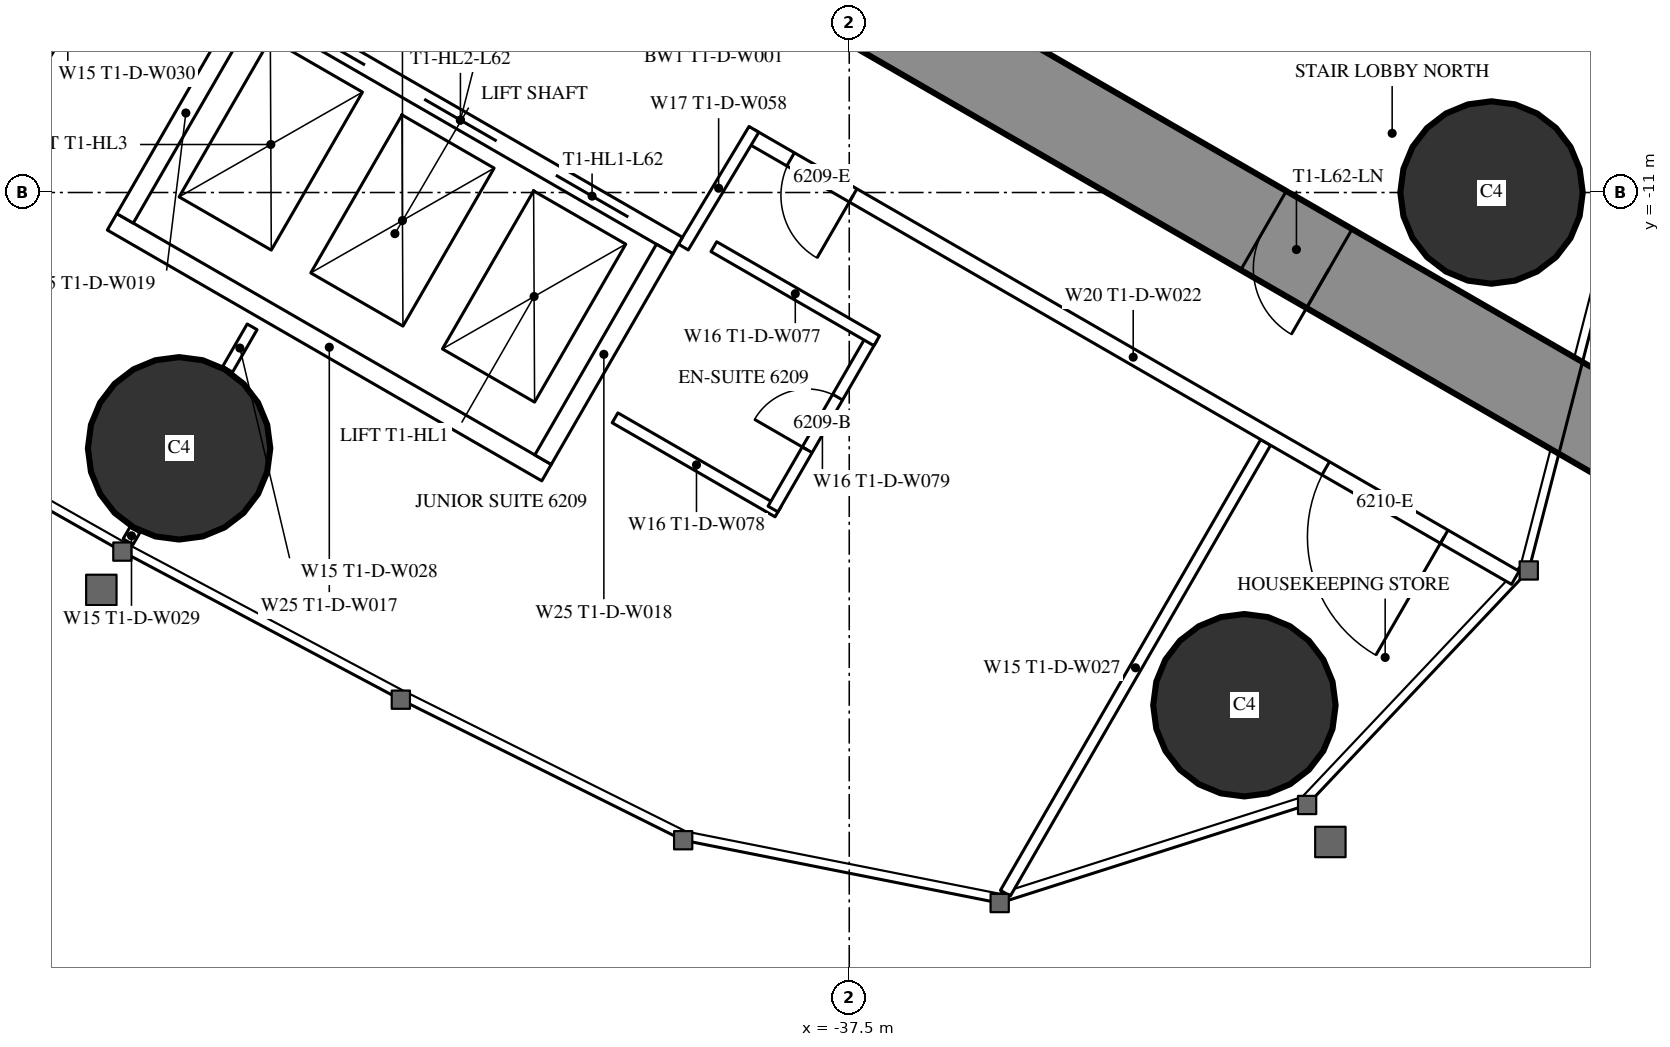
"""IFC4 building model, lengths in metres.
Left out: names, types, materials, properties, quantities, classifications, styles, units other than length and angle.
Written with IfcOpenShell. Run it as: python <this file> out.ifc"""

import sys

from ifc_helpers import new_model, si_unit, direction, frame, frame_2d, origin, origin_2d, place, context, subcontext, project, spatial, rectangle, circle, extrude, element, fill, save


model = new_model("IFC4")
c1 = context("Model", 3, precision=1e-05, world=origin(), true_north=direction((0.0, 1.0)))
c2 = subcontext(c1, "Body", "Model", "MODEL_VIEW")
j1 = project(units=[si_unit("LENGTHUNIT", "METRE"), si_unit("PLANEANGLEUNIT", "RADIAN")], contexts=[c1])
p1 = place(None, origin())
s1 = spatial("IfcSite", under=j1, at=p1, CompositionType="ELEMENT")
p2 = place(p1, origin())
s2 = spatial("IfcBuilding", under=s1, at=p2, CompositionType="ELEMENT")
p3 = place(p2, frame((0.0, 0.0, 233.3)))
s3 = spatial("IfcBuildingStorey", under=s2, at=p3, CompositionType="ELEMENT", Elevation=233.3)
for number, where, z_axis, x_axis in (
    (1, (-32.301, -17.745, 0.0), (0.0, 0.0, 1.0), (1.0, 0.0, 0.0)),
    (2, (-29.05, -11.0, 0.0), (0.0, 0.0, 1.0), (1.0, 0.0, 0.0)),
    (3, (-46.317, -14.365, 0.0), (0.0, 0.0, 1.0), (1.0, 0.0, 0.0)),
):
    element("IfcColumn", number, at=place(p3, frame(where, z_axis=z_axis, x_axis=x_axis)), inside=s3, PredefinedType="COLUMN", context=c2, shape_type="SweptSolid", body=[
        extrude(circle(Radius=1.2, at=origin_2d()), origin(), (0.0, 0.0, 1.0), 3.6),
    ])
p4 = place(p3, frame((-27.2, -14.3, 0.0), z_axis=(0.0, 0.0, 1.0), x_axis=(-0.866024021859, 0.500002393557, 0.0)))
e4 = element("IfcWall", 4, at=p4, inside=s3, PredefinedType="SHEAR", context=c2, shape_type="SweptSolid", body=[
    extrude(rectangle(XDim=27.907, YDim=1.2, at=frame_2d((13.954, 0.0))), origin(), (0.0, 0.0, 1.0), 3.6),
])
p5 = place(p4, frame((4.6, 0.0, 0.0)))
e5 = element("IfcOpeningElement", 5, at=p5, cuts=e4, PredefinedType="OPENING", context=c2, shape_type="SweptSolid", body=[
    extrude(rectangle(XDim=1.0, YDim=2.2, at=frame_2d((0.5, 1.1))), frame((0.0, 0.61, 0.0), z_axis=(0.0, -1.0, 0.0), x_axis=(1.0, 0.0, 0.0)), (0.0, 0.0, 1.0), 1.22),
])
p6 = place(p4, frame((13.395, 0.0, 0.0)))
e6 = element("IfcOpeningElement", 6, at=p6, cuts=e4, PredefinedType="OPENING", context=c2, shape_type="SweptSolid", body=[
    extrude(rectangle(XDim=1.8, YDim=2.2, at=frame_2d((0.9, 1.1))), frame((0.0, 0.61, 0.0), z_axis=(0.0, -1.0, 0.0), x_axis=(1.0, 0.0, 0.0)), (0.0, 0.0, 1.0), 1.22),
])
p7 = place(p3, frame((-32.022, -14.287, 0.0), z_axis=(0.0, 0.0, 1.0), x_axis=(-0.50000019414, -0.866025291697, 0.0)))
e7 = element("IfcWall", 7, at=p7, inside=s3, PredefinedType="PARTITIONING", context=c2, shape_type="SweptSolid", body=[
    extrude(rectangle(XDim=6.848, YDim=0.15, at=frame_2d((3.424, 0.0))), origin(), (0.0, 0.0, 1.0), 3.35),
])
p8 = place(p3, frame((-46.898, -15.439, 0.0), z_axis=(0.0, 0.0, 1.0), x_axis=(-0.500232303069, -0.865891241997, 0.0)))
e8 = element("IfcWall", 8, at=p8, inside=s3, PredefinedType="PARTITIONING", context=c2, shape_type="SweptSolid", body=[
    extrude(rectangle(XDim=0.18, YDim=0.15, at=frame_2d((0.09, 0.0))), origin(), (0.0, 0.0, 1.0), 2.45),
])
p9 = place(p3, frame((-46.274, -6.059, 0.0), z_axis=(0.0, 0.0, 1.0), x_axis=(-0.500020471368, -0.866013584312, 0.0)))
e9 = element("IfcWall", 9, at=p9, inside=s3, PredefinedType="PARTITIONING", context=c2, shape_type="SweptSolid", body=[
    extrude(rectangle(XDim=6.028, YDim=0.15, at=frame_2d((3.014, 0.0))), origin(), (0.0, 0.0, 1.0), 2.45),
])
p10 = place(p3, frame((-45.356, -12.767, 0.0), z_axis=(0.0, 0.0, 1.0), x_axis=(-0.499886366516, -0.866091000168, 0.0)))
e10 = element("IfcWall", 10, at=p10, inside=s3, PredefinedType="PARTITIONING", context=c2, shape_type="SweptSolid", body=[
    extrude(rectangle(XDim=0.645, YDim=0.15, at=frame_2d((0.322, 0.0))), origin(), (0.0, 0.0, 1.0), 3.35),
])
p11 = place(p3, frame((-28.737, -16.068, 0.0), z_axis=(0.0, 0.0, 1.0), x_axis=(-0.866029399323, 0.49999307946, 0.0)))
e11 = element("IfcWall", 11, at=p11, inside=s3, PredefinedType="PARTITIONING", context=c2, shape_type="SweptSolid", body=[
    extrude(rectangle(XDim=11.61, YDim=0.2, at=frame_2d((5.805, 0.0))), origin(), (0.0, 0.0, 1.0), 3.35),
])
p12 = place(p11, frame((1.08, 0.0, 0.0)))
e12 = element("IfcOpeningElement", 12, at=p12, cuts=e11, PredefinedType="OPENING", context=c2, shape_type="SweptSolid", body=[
    extrude(rectangle(XDim=1.8, YDim=2.03, at=frame_2d((0.9, 1.015))), frame((0.0, 0.11, 0.0), z_axis=(0.0, -1.0, 0.0), x_axis=(1.0, 0.0, 0.0)), (0.0, 0.0, 1.0), 0.22),
])
p13 = place(p11, frame((10.06, 0.0, 0.0)))
e13 = element("IfcOpeningElement", 13, at=p13, cuts=e11, PredefinedType="OPENING", context=c2, shape_type="SweptSolid", body=[
    extrude(rectangle(XDim=0.95, YDim=2.2, at=frame_2d((0.475, 1.1))), frame((0.0, 0.11, 0.0), z_axis=(0.0, -1.0, 0.0), x_axis=(1.0, 0.0, 0.0)), (0.0, 0.0, 1.0), 0.22),
])
p14 = place(p3, frame((-39.683, -11.718, 0.0), z_axis=(0.0, 0.0, 1.0), x_axis=(0.514336634837, 0.857588377991, 0.0)))
e14 = element("IfcWall", 14, at=p14, inside=s3, PredefinedType="PARTITIONING", context=c2, shape_type="SweptSolid", body=[
    extrude(rectangle(XDim=1.805, YDim=0.15, at=frame_2d((0.903, 0.0))), origin(), (0.0, 0.0, 1.0), 3.35),
])
p15 = place(p3, frame((-38.438, -15.202, 0.0), z_axis=(0.0, 0.0, 1.0), x_axis=(-0.866073894602, 0.499916002032, 0.0)))
e15 = element("IfcWall", 15, at=p15, inside=s3, PredefinedType="PARTITIONING", context=c2, shape_type="SweptSolid", body=[
    extrude(rectangle(XDim=2.475, YDim=0.15, at=frame_2d((1.238, 0.0))), origin(), (0.0, 0.0, 1.0), 3.35),
])
p16 = place(p3, frame((-37.203, -12.913, 0.0), z_axis=(0.0, 0.0, 1.0), x_axis=(-0.500006934395, -0.866021400173, 0.0)))
e16 = element("IfcWall", 16, at=p16, inside=s3, PredefinedType="PARTITIONING", context=c2, shape_type="SweptSolid", body=[
    extrude(rectangle(XDim=2.6, YDim=0.15, at=frame_2d((1.3, 0.0))), origin(), (0.0, 0.0, 1.0), 3.35),
])
p17 = place(p16, frame((0.9, 0.0, 0.0)))
e17 = element("IfcOpeningElement", 17, at=p17, cuts=e16, PredefinedType="OPENING", context=c2, shape_type="SweptSolid", body=[
    extrude(rectangle(XDim=0.8, YDim=2.2, at=frame_2d((0.4, 1.1))), frame((0.0, 0.085, 0.0), z_axis=(0.0, -1.0, 0.0), x_axis=(1.0, 0.0, 0.0)), (0.0, 0.0, 1.0), 0.17),
])
p18 = place(p3, frame((-37.138, -12.95, 0.0), z_axis=(0.0, 0.0, 1.0), x_axis=(-0.866031185235, 0.4999899861, 0.0)))
e18 = element("IfcWall", 18, at=p18, inside=s3, PredefinedType="PARTITIONING", context=c2, shape_type="SweptSolid", body=[
    extrude(rectangle(XDim=2.475, YDim=0.15, at=frame_2d((1.238, 0.0))), origin(), (0.0, 0.0, 1.0), 2.5),
])
p19 = place(p3, frame((-39.758, -11.697, 0.0), z_axis=(0.0, 0.0, 1.0), x_axis=(-0.866024194504, 0.500002094529, 0.0)))
e19 = element("IfcWall", 19, at=p19, inside=s3, PredefinedType="PARTITIONING", context=c2, shape_type="SweptSolid", body=[
    extrude(rectangle(XDim=6.6, YDim=0.25, at=frame_2d((3.3, 0.0))), origin(), (0.0, 0.0, 1.0), 3.35),
])
p20 = place(p19, frame((0.75, 0.0, 0.0)))
e20 = element("IfcOpeningElement", 20, at=p20, cuts=e19, PredefinedType="OPENING", context=c2, shape_type="SweptSolid", body=[
    extrude(rectangle(XDim=1.1, YDim=2.2, at=frame_2d((0.55, 1.1))), frame((0.0, 0.135, 0.0), z_axis=(0.0, -1.0, 0.0), x_axis=(1.0, 0.0, 0.0)), (0.0, 0.0, 1.0), 0.27),
])
p21 = place(p19, frame((2.75, 0.0, 0.0)))
e21 = element("IfcOpeningElement", 21, at=p21, cuts=e19, PredefinedType="OPENING", context=c2, shape_type="SweptSolid", body=[
    extrude(rectangle(XDim=1.1, YDim=2.2, at=frame_2d((0.55, 1.1))), frame((0.0, 0.135, 0.0), z_axis=(0.0, -1.0, 0.0), x_axis=(1.0, 0.0, 0.0)), (0.0, 0.0, 1.0), 0.27),
])
p22 = place(p19, frame((4.75, 0.0, 0.0)))
e22 = element("IfcOpeningElement", 22, at=p22, cuts=e19, PredefinedType="OPENING", context=c2, shape_type="SweptSolid", body=[
    extrude(rectangle(XDim=1.1, YDim=2.2, at=frame_2d((0.55, 1.1))), frame((0.0, 0.135, 0.0), z_axis=(0.0, -1.0, 0.0), x_axis=(1.0, 0.0, 0.0)), (0.0, 0.0, 1.0), 0.27),
])
p23 = place(p3, frame((-41.482, -14.686, 0.0), z_axis=(0.0, 0.0, 1.0), x_axis=(-0.86603344179, 0.499986077507, 0.0)))
e23 = element("IfcWall", 23, at=p23, inside=s3, PredefinedType="PARTITIONING", context=c2, shape_type="SweptSolid", body=[
    extrude(rectangle(XDim=6.6, YDim=0.25, at=frame_2d((3.3, 0.0))), origin(), (0.0, 0.0, 1.0), 3.35),
])
for number, where, z_axis, x_axis in (
    (24, (-39.928, -11.743, 0.0), (0.0, 0.0, 1.0), (-0.5, -0.866, 0.0)),
    (25, (-45.428, -8.568, 0.0), (0.0, 0.0, 1.0), (-0.5, -0.866, 0.0)),
):
    element("IfcWall", number, at=place(p3, frame(where, z_axis=z_axis, x_axis=x_axis)), inside=s3, PredefinedType="PARTITIONING", context=c2, shape_type="SweptSolid", body=[
        extrude(rectangle(XDim=3.201, YDim=0.25, at=frame_2d((1.6, 0.0))), origin(), (0.0, 0.0, 1.0), 3.35),
    ])
p24 = place(p12, origin())
e26 = element("IfcDoor", 26, at=p24, inside=s3, OperationType="DOUBLE_DOOR_SINGLE_SWING", PredefinedType="DOOR", context=c2, shape_type="SweptSolid", body=[
    extrude(rectangle(XDim=1.8, YDim=2.03, at=frame_2d((0.9, 1.015))), frame((0.0, 0.025, 0.0), z_axis=(0.0, -1.0, 0.0), x_axis=(1.0, 0.0, 0.0)), (0.0, 0.0, 1.0), 0.05),
])
fill(e12, e26)
p25 = place(p17, origin())
e27 = element("IfcDoor", 27, at=p25, inside=s3, OperationType="SINGLE_SWING_RIGHT", PredefinedType="DOOR", context=c2, shape_type="SweptSolid", body=[
    extrude(rectangle(XDim=0.8, YDim=2.2, at=frame_2d((0.4, 1.1))), frame((0.0, 0.025, 0.0), z_axis=(0.0, -1.0, 0.0), x_axis=(1.0, 0.0, 0.0)), (0.0, 0.0, 1.0), 0.05),
])
fill(e17, e27)
p26 = place(p13, origin())
e28 = element("IfcDoor", 28, at=p26, inside=s3, OperationType="SINGLE_SWING_LEFT", PredefinedType="DOOR", context=c2, shape_type="SweptSolid", body=[
    extrude(rectangle(XDim=0.95, YDim=2.2, at=frame_2d((0.475, 1.1))), frame((0.0, 0.025, 0.0), z_axis=(0.0, -1.0, 0.0), x_axis=(1.0, 0.0, 0.0)), (0.0, 0.0, 1.0), 0.05),
])
fill(e13, e28)
p27 = place(p5, origin())
e29 = element("IfcDoor", 29, at=p27, inside=s3, OperationType="SINGLE_SWING_LEFT", PredefinedType="DOOR", context=c2, shape_type="SweptSolid", body=[
    extrude(rectangle(XDim=1.0, YDim=2.2, at=frame_2d((0.5, 1.1))), frame((0.0, 0.025, 0.0), z_axis=(0.0, -1.0, 0.0), x_axis=(1.0, 0.0, 0.0)), (0.0, 0.0, 1.0), 0.05),
])
fill(e5, e29)
p28 = place(p20, origin())
e30 = element("IfcDoor", 30, at=p28, inside=s3, OperationType="DOUBLE_DOOR_SLIDING", PredefinedType="USERDEFINED", context=c2, shape_type="SweptSolid", body=[
    extrude(rectangle(XDim=1.1, YDim=2.2, at=frame_2d((0.55, 1.1))), frame((0.0, 0.025, 0.0), z_axis=(0.0, -1.0, 0.0), x_axis=(1.0, 0.0, 0.0)), (0.0, 0.0, 1.0), 0.05),
])
fill(e20, e30)
p29 = place(p21, origin())
e31 = element("IfcDoor", 31, at=p29, inside=s3, OperationType="DOUBLE_DOOR_SLIDING", PredefinedType="USERDEFINED", context=c2, shape_type="SweptSolid", body=[
    extrude(rectangle(XDim=1.1, YDim=2.2, at=frame_2d((0.55, 1.1))), frame((0.0, 0.025, 0.0), z_axis=(0.0, -1.0, 0.0), x_axis=(1.0, 0.0, 0.0)), (0.0, 0.0, 1.0), 0.05),
])
fill(e21, e31)
p30 = place(p22, origin())
e32 = element("IfcDoor", 32, at=p30, inside=s3, OperationType="DOUBLE_DOOR_SLIDING", PredefinedType="USERDEFINED", context=c2, shape_type="SweptSolid", body=[
    extrude(rectangle(XDim=1.1, YDim=2.2, at=frame_2d((0.55, 1.1))), frame((0.0, 0.025, 0.0), z_axis=(0.0, -1.0, 0.0), x_axis=(1.0, 0.0, 0.0)), (0.0, 0.0, 1.0), 0.05),
])
fill(e22, e32)
save(model, sys.argv[1])
